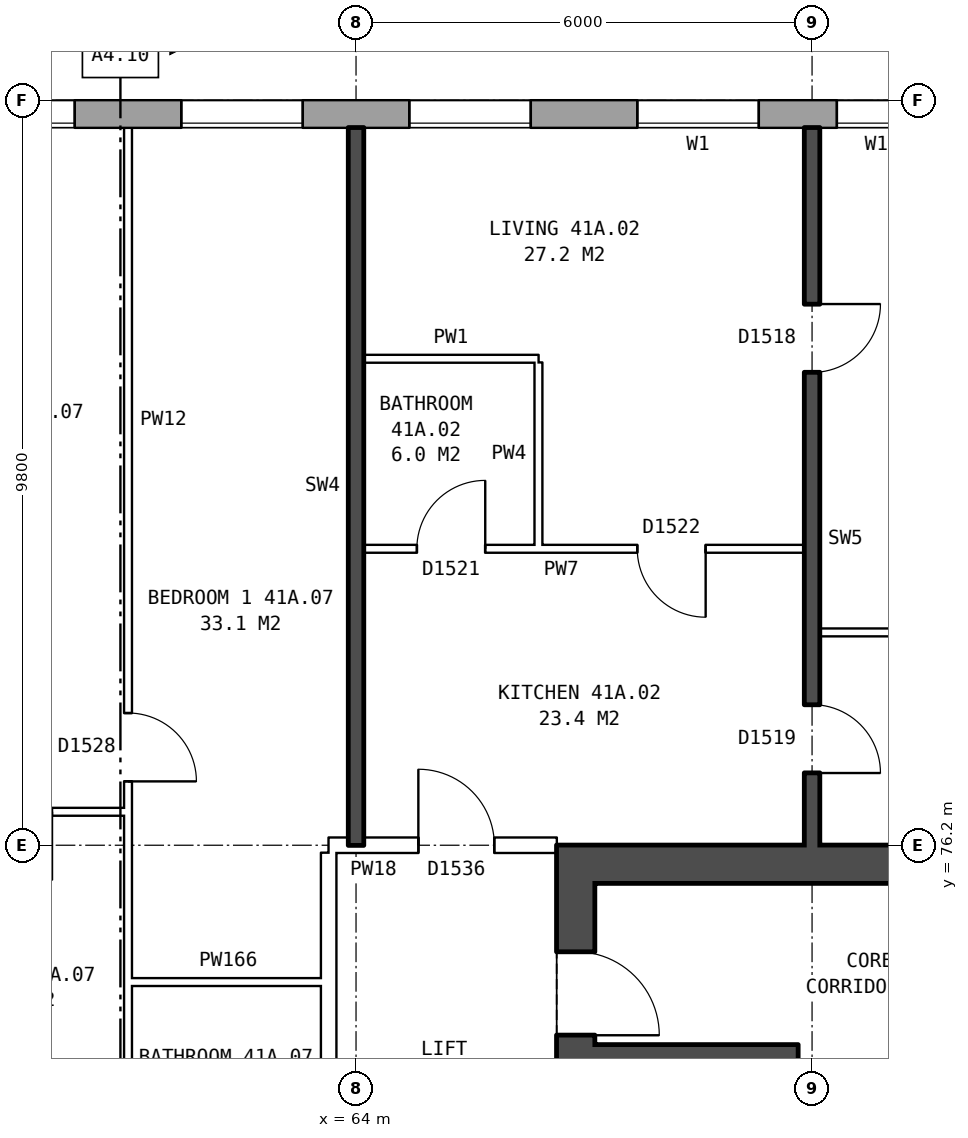
"""IFC4 building model, lengths in metres.
Left out: names, types, materials, properties, quantities, classifications, styles, units other than length and angle.
Written with IfcOpenShell. Run it as: python <this file> out.ifc"""

import sys

from ifc_helpers import new_model, si_unit, direction, frame, frame_2d, origin, place, context, subcontext, project, spatial, rectangle, extrude, element, fill, save


model = new_model("IFC4")
c1 = context("Model", 3, precision=1e-05, world=origin(), true_north=direction((0.0, 1.0)))
c2 = subcontext(c1, "Body", "Model", "MODEL_VIEW")
j1 = project(units=[si_unit("LENGTHUNIT", "METRE"), si_unit("PLANEANGLEUNIT", "RADIAN")], contexts=[c1])
p1 = place(None, origin())
s1 = spatial("IfcSite", under=j1, at=p1, CompositionType="ELEMENT")
p2 = place(p1, origin())
s2 = spatial("IfcBuilding", under=s1, at=p2, CompositionType="ELEMENT")
p3 = place(p2, frame((0.0, 0.0, 148.5)))
s3 = spatial("IfcBuildingStorey", under=s2, at=p3, CompositionType="ELEMENT", Elevation=148.5)
p4 = place(p3, frame((72.925, 85.82, 0.0), z_axis=(0.0, 0.0, 1.0), x_axis=(-1.0, 0.0, 0.0)))
e1 = element("IfcWall", 1, at=p4, inside=s3, PredefinedType="STANDARD", context=c2, shape_type="SweptSolid", body=[
    extrude(rectangle(XDim=41.351, YDim=0.36, at=frame_2d((20.675, 0.0))), origin(), (0.0, 0.0, 1.0), 2.85),
])
p5 = place(p4, frame((0.3, 0.0, 0.8)))
e2 = element("IfcOpeningElement", 2, at=p5, cuts=e1, PredefinedType="OPENING", context=c2, shape_type="SweptSolid", body=[
    extrude(rectangle(XDim=0.8, YDim=0.9, at=frame_2d((0.4, 0.45))), frame((0.0, 0.19, 0.0), z_axis=(0.0, -1.0, 0.0), x_axis=(1.0, 0.0, 0.0)), (0.0, 0.0, 1.0), 0.38),
])
p6 = place(p4, frame((3.625, 0.0, 0.8)))
e3 = element("IfcOpeningElement", 3, at=p6, cuts=e1, PredefinedType="OPENING", context=c2, shape_type="SweptSolid", body=[
    extrude(rectangle(XDim=1.6, YDim=1.8, at=frame_2d((0.8, 0.9))), frame((0.0, 0.19, 0.0), z_axis=(0.0, -1.0, 0.0), x_axis=(1.0, 0.0, 0.0)), (0.0, 0.0, 1.0), 0.38),
])
p7 = place(p4, frame((6.625, 0.0, 0.8)))
e4 = element("IfcOpeningElement", 4, at=p7, cuts=e1, PredefinedType="OPENING", context=c2, shape_type="SweptSolid", body=[
    extrude(rectangle(XDim=1.6, YDim=1.8, at=frame_2d((0.8, 0.9))), frame((0.0, 0.19, 0.0), z_axis=(0.0, -1.0, 0.0), x_axis=(1.0, 0.0, 0.0)), (0.0, 0.0, 1.0), 0.38),
])
p8 = place(p4, frame((9.625, 0.0, 0.8)))
e5 = element("IfcOpeningElement", 5, at=p8, cuts=e1, PredefinedType="OPENING", context=c2, shape_type="SweptSolid", body=[
    extrude(rectangle(XDim=1.6, YDim=1.8, at=frame_2d((0.8, 0.9))), frame((0.0, 0.19, 0.0), z_axis=(0.0, -1.0, 0.0), x_axis=(1.0, 0.0, 0.0)), (0.0, 0.0, 1.0), 0.38),
])
p9 = place(p4, frame((12.625, 0.0, 0.8)))
e6 = element("IfcOpeningElement", 6, at=p9, cuts=e1, PredefinedType="OPENING", context=c2, shape_type="SweptSolid", body=[
    extrude(rectangle(XDim=1.6, YDim=1.8, at=frame_2d((0.8, 0.9))), frame((0.0, 0.19, 0.0), z_axis=(0.0, -1.0, 0.0), x_axis=(1.0, 0.0, 0.0)), (0.0, 0.0, 1.0), 0.38),
])
p10 = place(p4, frame((15.625, 0.0, 0.8)))
e7 = element("IfcOpeningElement", 7, at=p10, cuts=e1, PredefinedType="OPENING", context=c2, shape_type="SweptSolid", body=[
    extrude(rectangle(XDim=1.6, YDim=1.8, at=frame_2d((0.8, 0.9))), frame((0.0, 0.19, 0.0), z_axis=(0.0, -1.0, 0.0), x_axis=(1.0, 0.0, 0.0)), (0.0, 0.0, 1.0), 0.38),
])
p11 = place(p4, frame((18.625, 0.0, 0.8)))
e8 = element("IfcOpeningElement", 8, at=p11, cuts=e1, PredefinedType="OPENING", context=c2, shape_type="SweptSolid", body=[
    extrude(rectangle(XDim=1.6, YDim=1.8, at=frame_2d((0.8, 0.9))), frame((0.0, 0.19, 0.0), z_axis=(0.0, -1.0, 0.0), x_axis=(1.0, 0.0, 0.0)), (0.0, 0.0, 1.0), 0.38),
])
p12 = place(p4, frame((21.625, 0.0, 0.8)))
e9 = element("IfcOpeningElement", 9, at=p12, cuts=e1, PredefinedType="OPENING", context=c2, shape_type="SweptSolid", body=[
    extrude(rectangle(XDim=1.6, YDim=1.8, at=frame_2d((0.8, 0.9))), frame((0.0, 0.19, 0.0), z_axis=(0.0, -1.0, 0.0), x_axis=(1.0, 0.0, 0.0)), (0.0, 0.0, 1.0), 0.38),
])
p13 = place(p4, frame((24.625, 0.0, 0.8)))
e10 = element("IfcOpeningElement", 10, at=p13, cuts=e1, PredefinedType="OPENING", context=c2, shape_type="SweptSolid", body=[
    extrude(rectangle(XDim=1.6, YDim=1.8, at=frame_2d((0.8, 0.9))), frame((0.0, 0.19, 0.0), z_axis=(0.0, -1.0, 0.0), x_axis=(1.0, 0.0, 0.0)), (0.0, 0.0, 1.0), 0.38),
])
p14 = place(p4, frame((27.625, 0.0, 0.8)))
e11 = element("IfcOpeningElement", 11, at=p14, cuts=e1, PredefinedType="OPENING", context=c2, shape_type="SweptSolid", body=[
    extrude(rectangle(XDim=1.6, YDim=1.8, at=frame_2d((0.8, 0.9))), frame((0.0, 0.19, 0.0), z_axis=(0.0, -1.0, 0.0), x_axis=(1.0, 0.0, 0.0)), (0.0, 0.0, 1.0), 0.38),
])
p15 = place(p4, frame((30.625, 0.0, 0.8)))
e12 = element("IfcOpeningElement", 12, at=p15, cuts=e1, PredefinedType="OPENING", context=c2, shape_type="SweptSolid", body=[
    extrude(rectangle(XDim=1.6, YDim=1.8, at=frame_2d((0.8, 0.9))), frame((0.0, 0.19, 0.0), z_axis=(0.0, -1.0, 0.0), x_axis=(1.0, 0.0, 0.0)), (0.0, 0.0, 1.0), 0.38),
])
p16 = place(p4, frame((33.625, 0.0, 0.8)))
e13 = element("IfcOpeningElement", 13, at=p16, cuts=e1, PredefinedType="OPENING", context=c2, shape_type="SweptSolid", body=[
    extrude(rectangle(XDim=1.6, YDim=1.8, at=frame_2d((0.8, 0.9))), frame((0.0, 0.19, 0.0), z_axis=(0.0, -1.0, 0.0), x_axis=(1.0, 0.0, 0.0)), (0.0, 0.0, 1.0), 0.38),
])
p17 = place(p4, frame((36.625, 0.0, 0.8)))
e14 = element("IfcOpeningElement", 14, at=p17, cuts=e1, PredefinedType="OPENING", context=c2, shape_type="SweptSolid", body=[
    extrude(rectangle(XDim=1.6, YDim=1.8, at=frame_2d((0.8, 0.9))), frame((0.0, 0.19, 0.0), z_axis=(0.0, -1.0, 0.0), x_axis=(1.0, 0.0, 0.0)), (0.0, 0.0, 1.0), 0.38),
])
p18 = place(p4, frame((1.4, 0.0, 0.8)))
e15 = element("IfcOpeningElement", 15, at=p18, cuts=e1, PredefinedType="OPENING", context=c2, shape_type="SweptSolid", body=[
    extrude(rectangle(XDim=1.2, YDim=1.8, at=frame_2d((0.6, 0.9))), frame((0.0, 0.19, 0.0), z_axis=(0.0, -1.0, 0.0), x_axis=(1.0, 0.0, 0.0)), (0.0, 0.0, 1.0), 0.38),
])
p19 = place(p3, frame((66.89, 63.8, 0.0), z_axis=(0.0, 0.0, 1.0), x_axis=(0.0, 1.0, 0.0)))
e16 = element("IfcWall", 16, at=p19, inside=s3, PredefinedType="SHEAR", context=c2, shape_type="SweptSolid", body=[
    extrude(rectangle(XDim=12.4, YDim=0.5, at=frame_2d((6.2, 0.0))), origin(), (0.0, 0.0, 1.0), 2.85),
])
p20 = place(p19, frame((1.325, 0.0, 0.0)))
e17 = element("IfcOpeningElement", 17, at=p20, cuts=e16, PredefinedType="OPENING", context=c2, shape_type="SweptSolid", body=[
    extrude(rectangle(XDim=1.1, YDim=2.1, at=frame_2d((0.55, 1.05))), frame((0.0, 0.26, 0.0), z_axis=(0.0, -1.0, 0.0), x_axis=(1.0, 0.0, 0.0)), (0.0, 0.0, 1.0), 0.52),
])
p21 = place(p19, frame((3.6, 0.0, 0.0)))
e18 = element("IfcOpeningElement", 18, at=p21, cuts=e16, PredefinedType="OPENING", context=c2, shape_type="SweptSolid", body=[
    extrude(rectangle(XDim=1.1, YDim=2.1, at=frame_2d((0.55, 1.05))), frame((0.0, 0.26, 0.0), z_axis=(0.0, -1.0, 0.0), x_axis=(1.0, 0.0, 0.0)), (0.0, 0.0, 1.0), 0.52),
])
p22 = place(p19, frame((5.8, 0.0, 0.0)))
e19 = element("IfcOpeningElement", 19, at=p22, cuts=e16, PredefinedType="OPENING", context=c2, shape_type="SweptSolid", body=[
    extrude(rectangle(XDim=1.1, YDim=2.1, at=frame_2d((0.55, 1.05))), frame((0.0, 0.26, 0.0), z_axis=(0.0, -1.0, 0.0), x_axis=(1.0, 0.0, 0.0)), (0.0, 0.0, 1.0), 0.52),
])
p23 = place(p19, frame((8.0, 0.0, 0.0)))
e20 = element("IfcOpeningElement", 20, at=p23, cuts=e16, PredefinedType="OPENING", context=c2, shape_type="SweptSolid", body=[
    extrude(rectangle(XDim=1.1, YDim=2.1, at=frame_2d((0.55, 1.05))), frame((0.0, 0.26, 0.0), z_axis=(0.0, -1.0, 0.0), x_axis=(1.0, 0.0, 0.0)), (0.0, 0.0, 1.0), 0.52),
])
p24 = place(p19, frame((9.9, 0.0, 0.0)))
e21 = element("IfcOpeningElement", 21, at=p24, cuts=e16, PredefinedType="OPENING", context=c2, shape_type="SweptSolid", body=[
    extrude(rectangle(XDim=1.1, YDim=2.1, at=frame_2d((0.55, 1.05))), frame((0.0, 0.26, 0.0), z_axis=(0.0, -1.0, 0.0), x_axis=(1.0, 0.0, 0.0)), (0.0, 0.0, 1.0), 0.52),
])
p25 = place(p3, frame((67.14, 75.95, 0.0), z_axis=(0.0, 0.0, 1.0), x_axis=(1.0, 0.0, 0.0)))
e22 = element("IfcWall", 22, at=p25, inside=s3, PredefinedType="SHEAR", context=c2, shape_type="SweptSolid", body=[
    extrude(rectangle(XDim=8.0, YDim=0.5, at=frame_2d((4.0, 0.0))), origin(), (0.0, 0.0, 1.0), 2.85),
])
p26 = place(p3, frame((67.14, 73.45, 0.0), z_axis=(0.0, 0.0, 1.0), x_axis=(1.0, 0.0, 0.0)))
e23 = element("IfcWall", 23, at=p26, inside=s3, PredefinedType="SHEAR", context=c2, shape_type="SweptSolid", body=[
    extrude(rectangle(XDim=2.425, YDim=0.25, at=frame_2d((1.212, 0.0))), origin(), (0.0, 0.0, 1.0), 2.85),
])
p27 = place(p3, frame((69.69, 66.975, 0.0), z_axis=(0.0, 0.0, 1.0), x_axis=(0.0, 1.0, 0.0)))
e24 = element("IfcWall", 24, at=p27, inside=s3, PredefinedType="SHEAR", context=c2, shape_type="SweptSolid", body=[
    extrude(rectangle(XDim=6.6, YDim=0.25, at=frame_2d((3.3, 0.0))), origin(), (0.0, 0.0, 1.0), 2.85),
])
p28 = place(p3, frame((63.64, 63.9, 0.0), z_axis=(0.0, 0.0, 1.0), x_axis=(0.0, 1.0, 0.0)))
e25 = element("IfcWall", 25, at=p28, inside=s3, PredefinedType="PARTITIONING", context=c2, shape_type="SweptSolid", body=[
    extrude(rectangle(XDim=12.2, YDim=0.2, at=frame_2d((6.1, 0.0))), origin(), (0.0, 0.0, 1.0), 2.85),
])
p29 = place(p28, frame((5.1, 0.0, 0.0)))
e26 = element("IfcOpeningElement", 26, at=p29, cuts=e25, PredefinedType="OPENING", context=c2, shape_type="SweptSolid", body=[
    extrude(rectangle(XDim=2.0, YDim=2.1, at=frame_2d((1.0, 1.05))), frame((0.0, 0.11, 0.0), z_axis=(0.0, -1.0, 0.0), x_axis=(1.0, 0.0, 0.0)), (0.0, 0.0, 1.0), 0.22),
])
p30 = place(p3, frame((61.0, 74.4, 0.0), z_axis=(0.0, 0.0, 1.0), x_axis=(1.0, 0.0, 0.0)))
e27 = element("IfcWall", 27, at=p30, inside=s3, PredefinedType="PARTITIONING", context=c2, shape_type="SweptSolid", body=[
    extrude(rectangle(XDim=2.64, YDim=0.1, at=frame_2d((1.32, 0.0))), origin(), (0.0, 0.0, 1.0), 2.85),
])
p31 = place(p3, frame((63.64, 76.2, 0.0), z_axis=(0.0, 0.0, 1.0), x_axis=(1.0, 0.0, 0.0)))
e28 = element("IfcWall", 28, at=p31, inside=s3, PredefinedType="PARTITIONING", context=c2, shape_type="SweptSolid", body=[
    extrude(rectangle(XDim=3.0, YDim=0.2, at=frame_2d((1.5, 0.0))), origin(), (0.0, 0.0, 1.0), 2.85),
])
p32 = place(p31, frame((1.18, 0.0, 0.0)))
e29 = element("IfcOpeningElement", 29, at=p32, cuts=e28, PredefinedType="OPENING", context=c2, shape_type="SweptSolid", body=[
    extrude(rectangle(XDim=1.0, YDim=2.1, at=frame_2d((0.5, 1.05))), frame((0.0, 0.11, 0.0), z_axis=(0.0, -1.0, 0.0), x_axis=(1.0, 0.0, 0.0)), (0.0, 0.0, 1.0), 0.22),
])
p33 = place(p3, frame((58.1, 76.64, 0.0), z_axis=(0.0, 0.0, 1.0), x_axis=(1.0, 0.0, 0.0)))
e30 = element("IfcWall", 30, at=p33, inside=s3, PredefinedType="PARTITIONING", context=c2, shape_type="SweptSolid", body=[
    extrude(rectangle(XDim=2.9, YDim=0.1, at=frame_2d((1.45, 0.0))), origin(), (0.0, 0.0, 1.0), 2.85),
])
p34 = place(p33, frame((1.0, 0.0, 0.0)))
e31 = element("IfcOpeningElement", 31, at=p34, cuts=e30, PredefinedType="OPENING", context=c2, shape_type="SweptSolid", body=[
    extrude(rectangle(XDim=0.9, YDim=2.1, at=frame_2d((0.45, 1.05))), frame((0.0, 0.06, 0.0), z_axis=(0.0, -1.0, 0.0), x_axis=(1.0, 0.0, 0.0)), (0.0, 0.0, 1.0), 0.12),
])
p35 = place(p3, frame((70.1, 79.0, 0.0), z_axis=(0.0, 0.0, 1.0), x_axis=(1.0, 0.0, 0.0)))
e32 = element("IfcWall", 32, at=p35, inside=s3, PredefinedType="PARTITIONING", context=c2, shape_type="SweptSolid", body=[
    extrude(rectangle(XDim=5.54, YDim=0.1, at=frame_2d((2.77, 0.0))), origin(), (0.0, 0.0, 1.0), 2.85),
])
p36 = place(p3, frame((64.1, 80.1, 0.0), z_axis=(0.0, 0.0, 1.0), x_axis=(1.0, 0.0, 0.0)))
e33 = element("IfcWall", 33, at=p36, inside=s3, PredefinedType="PARTITIONING", context=c2, shape_type="SweptSolid", body=[
    extrude(rectangle(XDim=5.8, YDim=0.1, at=frame_2d((2.9, 0.0))), origin(), (0.0, 0.0, 1.0), 2.85),
])
p37 = place(p36, frame((3.6, 0.0, 0.0)))
e34 = element("IfcOpeningElement", 34, at=p37, cuts=e33, PredefinedType="OPENING", context=c2, shape_type="SweptSolid", body=[
    extrude(rectangle(XDim=0.9, YDim=2.1, at=frame_2d((0.45, 1.05))), frame((0.0, 0.06, 0.0), z_axis=(0.0, -1.0, 0.0), x_axis=(1.0, 0.0, 0.0)), (0.0, 0.0, 1.0), 0.12),
])
p38 = place(p36, frame((0.7, 0.0, 0.0)))
e35 = element("IfcOpeningElement", 35, at=p38, cuts=e33, PredefinedType="OPENING", context=c2, shape_type="SweptSolid", body=[
    extrude(rectangle(XDim=0.9, YDim=2.1, at=frame_2d((0.45, 1.05))), frame((0.0, 0.06, 0.0), z_axis=(0.0, -1.0, 0.0), x_axis=(1.0, 0.0, 0.0)), (0.0, 0.0, 1.0), 0.12),
])
p39 = place(p3, frame((64.1, 82.6, 0.0), z_axis=(0.0, 0.0, 1.0), x_axis=(1.0, 0.0, 0.0)))
e36 = element("IfcWall", 36, at=p39, inside=s3, PredefinedType="PARTITIONING", context=c2, shape_type="SweptSolid", body=[
    extrude(rectangle(XDim=2.3, YDim=0.1, at=frame_2d((1.15, 0.0))), origin(), (0.0, 0.0, 1.0), 2.85),
])
p40 = place(p3, frame((61.0, 71.3, 0.0), z_axis=(0.0, 0.0, 1.0), x_axis=(0.0, 1.0, 0.0)))
e37 = element("IfcWall", 37, at=p40, inside=s3, PredefinedType="PARTITIONING", context=c2, shape_type="SweptSolid", body=[
    extrude(rectangle(XDim=14.34, YDim=0.1, at=frame_2d((7.17, 0.0))), origin(), (0.0, 0.0, 1.0), 2.85),
])
p41 = place(p40, frame((5.74, 0.0, 0.0)))
e38 = element("IfcOpeningElement", 38, at=p41, cuts=e37, PredefinedType="OPENING", context=c2, shape_type="SweptSolid", body=[
    extrude(rectangle(XDim=0.9, YDim=2.1, at=frame_2d((0.45, 1.05))), frame((0.0, 0.06, 0.0), z_axis=(0.0, -1.0, 0.0), x_axis=(1.0, 0.0, 0.0)), (0.0, 0.0, 1.0), 0.12),
])
p42 = place(p40, frame((0.4, 0.0, 0.0)))
e39 = element("IfcOpeningElement", 39, at=p42, cuts=e37, PredefinedType="OPENING", context=c2, shape_type="SweptSolid", body=[
    extrude(rectangle(XDim=0.9, YDim=2.1, at=frame_2d((0.45, 1.05))), frame((0.0, 0.06, 0.0), z_axis=(0.0, -1.0, 0.0), x_axis=(1.0, 0.0, 0.0)), (0.0, 0.0, 1.0), 0.12),
])
p43 = place(p3, frame((64.0, 76.2, 0.0), z_axis=(0.0, 0.0, 1.0), x_axis=(0.0, 1.0, 0.0)))
e40 = element("IfcWall", 40, at=p43, inside=s3, PredefinedType="SOLIDWALL", context=c2, shape_type="SweptSolid", body=[
    extrude(rectangle(XDim=9.44, YDim=0.2, at=frame_2d((4.72, 0.0))), origin(), (0.0, 0.0, 1.0), 2.85),
])
p44 = place(p3, frame((66.4, 80.15, 0.0), z_axis=(0.0, 0.0, 1.0), x_axis=(0.0, 1.0, 0.0)))
e41 = element("IfcWall", 41, at=p44, inside=s3, PredefinedType="PARTITIONING", context=c2, shape_type="SweptSolid", body=[
    extrude(rectangle(XDim=2.4, YDim=0.1, at=frame_2d((1.2, 0.0))), origin(), (0.0, 0.0, 1.0), 2.85),
])
p45 = place(p3, frame((70.0, 76.2, 0.0), z_axis=(0.0, 0.0, 1.0), x_axis=(0.0, 1.0, 0.0)))
e42 = element("IfcWall", 42, at=p45, inside=s3, PredefinedType="SOLIDWALL", context=c2, shape_type="SweptSolid", body=[
    extrude(rectangle(XDim=9.44, YDim=0.2, at=frame_2d((4.72, 0.0))), origin(), (0.0, 0.0, 1.0), 2.85),
])
p46 = place(p45, frame((6.22, 0.0, 0.0)))
e43 = element("IfcOpeningElement", 43, at=p46, cuts=e42, PredefinedType="OPENING", context=c2, shape_type="SweptSolid", body=[
    extrude(rectangle(XDim=0.9, YDim=2.1, at=frame_2d((0.45, 1.05))), frame((0.0, 0.11, 0.0), z_axis=(0.0, -1.0, 0.0), x_axis=(1.0, 0.0, 0.0)), (0.0, 0.0, 1.0), 0.22),
])
p47 = place(p45, frame((0.95, 0.0, 0.0)))
e44 = element("IfcOpeningElement", 44, at=p47, cuts=e42, PredefinedType="OPENING", context=c2, shape_type="SweptSolid", body=[
    extrude(rectangle(XDim=0.9, YDim=2.1, at=frame_2d((0.45, 1.05))), frame((0.0, 0.11, 0.0), z_axis=(0.0, -1.0, 0.0), x_axis=(1.0, 0.0, 0.0)), (0.0, 0.0, 1.0), 0.22),
])
p48 = place(p6, origin())
e45 = element("IfcWindow", 45, at=p48, inside=s3, PartitioningType="SINGLE_PANEL", PredefinedType="WINDOW", context=c2, shape_type="SweptSolid", body=[
    extrude(rectangle(XDim=1.6, YDim=1.8, at=frame_2d((0.8, 0.9))), frame((0.0, 0.15, 0.0), z_axis=(0.0, -1.0, 0.0), x_axis=(1.0, 0.0, 0.0)), (0.0, 0.0, 1.0), 0.06),
])
fill(e3, e45)
p49 = place(p7, origin())
e46 = element("IfcWindow", 46, at=p49, inside=s3, PartitioningType="SINGLE_PANEL", PredefinedType="WINDOW", context=c2, shape_type="SweptSolid", body=[
    extrude(rectangle(XDim=1.6, YDim=1.8, at=frame_2d((0.8, 0.9))), frame((0.0, 0.15, 0.0), z_axis=(0.0, -1.0, 0.0), x_axis=(1.0, 0.0, 0.0)), (0.0, 0.0, 1.0), 0.06),
])
fill(e4, e46)
p50 = place(p8, origin())
e47 = element("IfcWindow", 47, at=p50, inside=s3, PartitioningType="SINGLE_PANEL", PredefinedType="WINDOW", context=c2, shape_type="SweptSolid", body=[
    extrude(rectangle(XDim=1.6, YDim=1.8, at=frame_2d((0.8, 0.9))), frame((0.0, 0.15, 0.0), z_axis=(0.0, -1.0, 0.0), x_axis=(1.0, 0.0, 0.0)), (0.0, 0.0, 1.0), 0.06),
])
fill(e5, e47)
p51 = place(p9, origin())
e48 = element("IfcWindow", 48, at=p51, inside=s3, PartitioningType="SINGLE_PANEL", PredefinedType="WINDOW", context=c2, shape_type="SweptSolid", body=[
    extrude(rectangle(XDim=1.6, YDim=1.8, at=frame_2d((0.8, 0.9))), frame((0.0, 0.15, 0.0), z_axis=(0.0, -1.0, 0.0), x_axis=(1.0, 0.0, 0.0)), (0.0, 0.0, 1.0), 0.06),
])
fill(e6, e48)
p52 = place(p24, frame((1.1, 0.0, 0.0), z_axis=(0.0, 0.0, 1.0), x_axis=(-1.0, 0.0, 0.0)))
e49 = element("IfcDoor", 49, at=p52, inside=s3, OperationType="SINGLE_SWING_RIGHT", PredefinedType="DOOR", context=c2, shape_type="SweptSolid", body=[
    extrude(rectangle(XDim=1.1, YDim=2.1, at=frame_2d((0.55, 1.05))), frame((0.0, 0.235, 0.0), z_axis=(0.0, -1.0, 0.0), x_axis=(1.0, 0.0, 0.0)), (0.0, 0.0, 1.0), 0.05),
])
fill(e21, e49)
p53 = place(p46, frame((0.9, 0.0, 0.0), z_axis=(0.0, 0.0, 1.0), x_axis=(-1.0, 0.0, 0.0)))
e50 = element("IfcDoor", 50, at=p53, inside=s3, OperationType="SINGLE_SWING_LEFT", PredefinedType="DOOR", context=c2, shape_type="SweptSolid", body=[
    extrude(rectangle(XDim=0.9, YDim=2.1, at=frame_2d((0.45, 1.05))), frame((0.0, 0.025, 0.0), z_axis=(0.0, -1.0, 0.0), x_axis=(1.0, 0.0, 0.0)), (0.0, 0.0, 1.0), 0.05),
])
fill(e43, e50)
p54 = place(p47, frame((0.9, 0.0, 0.0), z_axis=(0.0, 0.0, 1.0), x_axis=(-1.0, 0.0, 0.0)))
e51 = element("IfcDoor", 51, at=p54, inside=s3, OperationType="SINGLE_SWING_RIGHT", PredefinedType="DOOR", context=c2, shape_type="SweptSolid", body=[
    extrude(rectangle(XDim=0.9, YDim=2.1, at=frame_2d((0.45, 1.05))), frame((0.0, 0.025, 0.0), z_axis=(0.0, -1.0, 0.0), x_axis=(1.0, 0.0, 0.0)), (0.0, 0.0, 1.0), 0.05),
])
fill(e44, e51)
p55 = place(p32, origin())
e52 = element("IfcDoor", 52, at=p55, inside=s3, OperationType="SINGLE_SWING_LEFT", PredefinedType="DOOR", context=c2, shape_type="SweptSolid", body=[
    extrude(rectangle(XDim=1.0, YDim=2.1, at=frame_2d((0.5, 1.05))), frame((0.0, 0.025, 0.0), z_axis=(0.0, -1.0, 0.0), x_axis=(1.0, 0.0, 0.0)), (0.0, 0.0, 1.0), 0.05),
])
fill(e29, e52)
p56 = place(p37, frame((0.9, 0.0, 0.0), z_axis=(0.0, 0.0, 1.0), x_axis=(-1.0, 0.0, 0.0)))
e53 = element("IfcDoor", 53, at=p56, inside=s3, OperationType="SINGLE_SWING_LEFT", PredefinedType="DOOR", context=c2, shape_type="SweptSolid", body=[
    extrude(rectangle(XDim=0.9, YDim=2.1, at=frame_2d((0.45, 1.05))), frame((0.0, 0.025, 0.0), z_axis=(0.0, -1.0, 0.0), x_axis=(1.0, 0.0, 0.0)), (0.0, 0.0, 1.0), 0.05),
])
fill(e34, e53)
p57 = place(p38, origin())
e54 = element("IfcDoor", 54, at=p57, inside=s3, OperationType="SINGLE_SWING_RIGHT", PredefinedType="DOOR", context=c2, shape_type="SweptSolid", body=[
    extrude(rectangle(XDim=0.9, YDim=2.1, at=frame_2d((0.45, 1.05))), frame((0.0, 0.025, 0.0), z_axis=(0.0, -1.0, 0.0), x_axis=(1.0, 0.0, 0.0)), (0.0, 0.0, 1.0), 0.05),
])
fill(e35, e54)
p58 = place(p41, frame((0.9, 0.0, 0.0), z_axis=(0.0, 0.0, 1.0), x_axis=(-1.0, 0.0, 0.0)))
e55 = element("IfcDoor", 55, at=p58, inside=s3, OperationType="SINGLE_SWING_RIGHT", PredefinedType="DOOR", context=c2, shape_type="SweptSolid", body=[
    extrude(rectangle(XDim=0.9, YDim=2.1, at=frame_2d((0.45, 1.05))), frame((0.0, 0.025, 0.0), z_axis=(0.0, -1.0, 0.0), x_axis=(1.0, 0.0, 0.0)), (0.0, 0.0, 1.0), 0.05),
])
fill(e38, e55)
p59 = place(p18, origin())
e56 = element("IfcWindow", 56, at=p59, inside=s3, PartitioningType="SINGLE_PANEL", PredefinedType="WINDOW", context=c2, shape_type="SweptSolid", body=[
    extrude(rectangle(XDim=1.2, YDim=1.8, at=frame_2d((0.6, 0.9))), frame((0.0, 0.15, 0.0), z_axis=(0.0, -1.0, 0.0), x_axis=(1.0, 0.0, 0.0)), (0.0, 0.0, 1.0), 0.06),
])
fill(e15, e56)
save(model, sys.argv[1])
